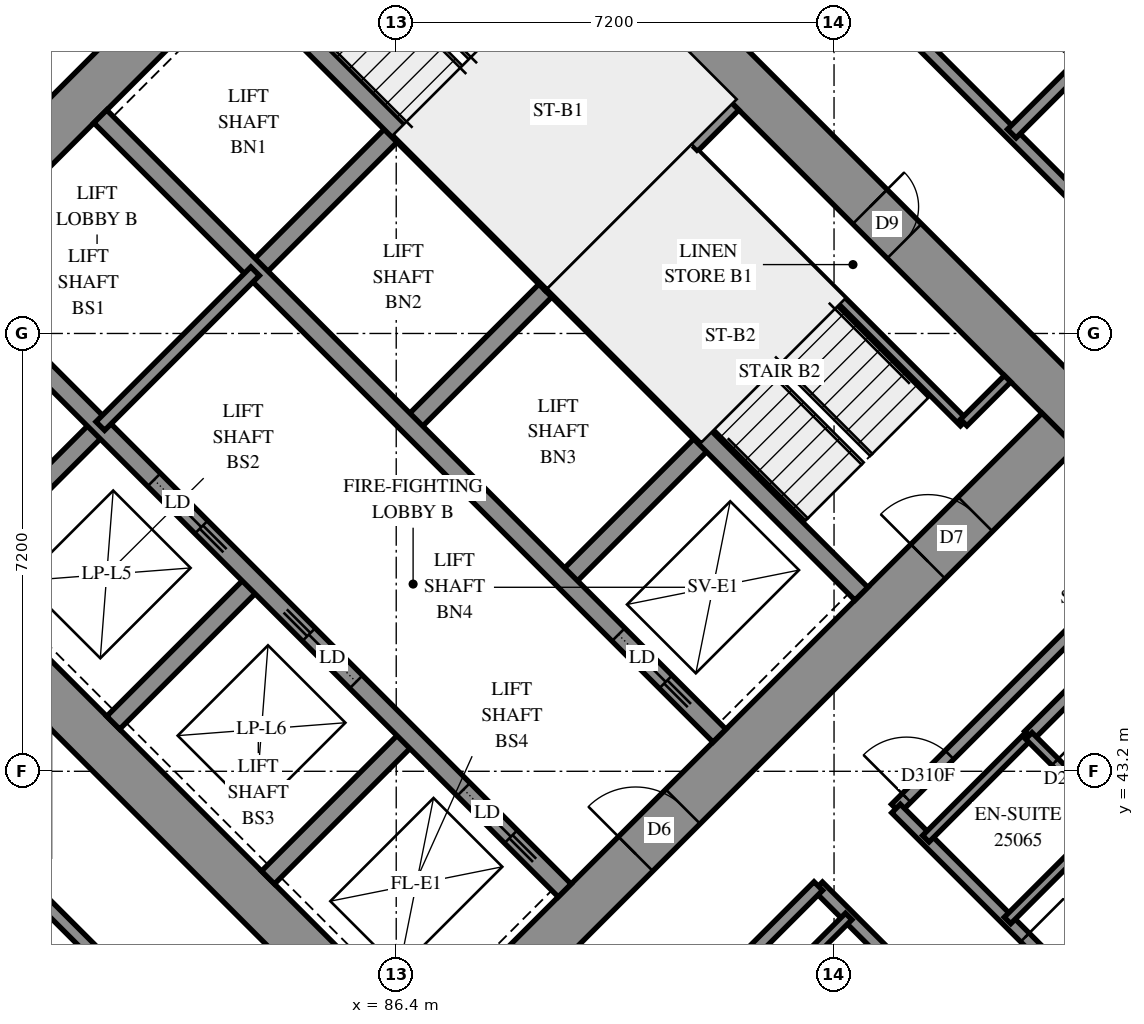
"""IFC4 building model, lengths in metres.
Left out: names, types, materials, properties, quantities, classifications, styles, units other than length and angle.
Written with IfcOpenShell. Run it as: python <this file> out.ifc"""

import sys

from ifc_helpers import new_model, si_unit, direction, frame, frame_2d, origin, place, context, subcontext, project, spatial, polyline, rectangle, outline, extrude, element, fill, save


model = new_model("IFC4")
c1 = context("Model", 3, precision=1e-05, world=origin(), true_north=direction((0.0, 1.0)))
c2 = subcontext(c1, "Body", "Model", "MODEL_VIEW")
j1 = project(units=[si_unit("LENGTHUNIT", "METRE"), si_unit("PLANEANGLEUNIT", "RADIAN")], contexts=[c1])
p1 = place(None, origin())
s1 = spatial("IfcSite", under=j1, at=p1, CompositionType="ELEMENT")
p2 = place(p1, origin())
s2 = spatial("IfcBuilding", under=s1, at=p2, CompositionType="ELEMENT")
p3 = place(p2, frame((0.0, 0.0, 94.8)))
s3 = spatial("IfcBuildingStorey", under=s2, at=p3, CompositionType="ELEMENT", Elevation=94.8)
p4 = place(p3, frame((75.806, 49.373, -0.3), z_axis=(0.0, 0.0, 1.0), x_axis=(0.7071067812, -0.7071067812, 0.0)))
e1 = element("IfcWall", 1, at=p4, inside=s3, PredefinedType="SHEAR", context=c2, shape_type="SweptSolid", body=[
    extrude(rectangle(XDim=16.0, YDim=0.8, at=frame_2d((8.0, 0.0))), origin(), (0.0, 0.0, 1.0), 2.7),
])
p5 = place(p3, frame((86.554, 60.121, -0.3), z_axis=(0.0, 0.0, 1.0), x_axis=(0.7071067812, -0.7071067812, 0.0)))
e2 = element("IfcWall", 2, at=p5, inside=s3, PredefinedType="SHEAR", context=c2, shape_type="SweptSolid", body=[
    extrude(rectangle(XDim=16.0, YDim=0.8, at=frame_2d((8.0, 0.0))), origin(), (0.0, 0.0, 1.0), 2.7),
])
p6 = place(p5, frame((10.8, 0.0, 0.3)))
e3 = element("IfcOpeningElement", 3, at=p6, cuts=e2, PredefinedType="OPENING", context=c2, shape_type="SweptSolid", body=[
    extrude(rectangle(XDim=0.8, YDim=2.1, at=frame_2d((0.4, 1.05))), frame((0.0, 0.41, 0.0), z_axis=(0.0, -1.0, 0.0), x_axis=(1.0, 0.0, 0.0)), (0.0, 0.0, 1.0), 0.82),
])
p7 = place(p3, frame((76.372, 49.373, -0.3), z_axis=(0.0, 0.0, 1.0), x_axis=(0.7071067812, 0.7071067812, 0.0)))
e4 = element("IfcWall", 4, at=p7, inside=s3, PredefinedType="SHEAR", context=c2, shape_type="SweptSolid", body=[
    extrude(rectangle(XDim=14.4, YDim=0.8, at=frame_2d((7.2, 0.0))), origin(), (0.0, 0.0, 1.0), 2.7),
])
p8 = place(p7, frame((4.55, 0.0, 0.3)))
e5 = element("IfcOpeningElement", 5, at=p8, cuts=e4, PredefinedType="OPENING", context=c2, shape_type="SweptSolid", body=[
    extrude(rectangle(XDim=1.1, YDim=2.1, at=frame_2d((0.55, 1.05))), frame((0.0, 0.41, 0.0), z_axis=(0.0, -1.0, 0.0), x_axis=(1.0, 0.0, 0.0)), (0.0, 0.0, 1.0), 0.82),
])
p9 = place(p7, frame((11.35, 0.0, 0.3)))
e6 = element("IfcOpeningElement", 6, at=p9, cuts=e4, PredefinedType="OPENING", context=c2, shape_type="SweptSolid", body=[
    extrude(rectangle(XDim=1.1, YDim=2.1, at=frame_2d((0.55, 1.05))), frame((0.0, 0.41, 0.0), z_axis=(0.0, -1.0, 0.0), x_axis=(1.0, 0.0, 0.0)), (0.0, 0.0, 1.0), 0.82),
])
p10 = place(p3, frame((87.12, 38.625, -0.3), z_axis=(0.0, 0.0, 1.0), x_axis=(0.7071067812, 0.7071067812, 0.0)))
e7 = element("IfcWall", 7, at=p10, inside=s3, PredefinedType="SHEAR", context=c2, shape_type="SweptSolid", body=[
    extrude(rectangle(XDim=14.4, YDim=0.8, at=frame_2d((7.2, 0.0))), origin(), (0.0, 0.0, 1.0), 2.7),
])
p11 = place(p10, frame((4.55, 0.0, 0.3)))
e8 = element("IfcOpeningElement", 8, at=p11, cuts=e7, PredefinedType="OPENING", context=c2, shape_type="SweptSolid", body=[
    extrude(rectangle(XDim=1.1, YDim=2.1, at=frame_2d((0.55, 1.05))), frame((0.0, 0.41, 0.0), z_axis=(0.0, -1.0, 0.0), x_axis=(1.0, 0.0, 0.0)), (0.0, 0.0, 1.0), 0.82),
])
p12 = place(p10, frame((11.35, 0.0, 0.3)))
e9 = element("IfcOpeningElement", 9, at=p12, cuts=e7, PredefinedType="OPENING", context=c2, shape_type="SweptSolid", body=[
    extrude(rectangle(XDim=1.1, YDim=2.1, at=frame_2d((0.55, 1.05))), frame((0.0, 0.41, 0.0), z_axis=(0.0, -1.0, 0.0), x_axis=(1.0, 0.0, 0.0)), (0.0, 0.0, 1.0), 0.82),
])
for number, where, z_axis, x_axis in (
    (10, (79.2, 46.544, 0.0), (0.0, 0.0, 1.0), (0.707, 0.707, 0.0)),
    (11, (84.079, 51.423, 0.0), (0.0, 0.0, 1.0), (0.707, 0.707, 0.0)),
):
    element("IfcWall", number, at=place(p3, frame(where, z_axis=z_axis, x_axis=x_axis)), inside=s3, PredefinedType="SOLIDWALL", context=c2, shape_type="SweptSolid", body=[
        extrude(rectangle(XDim=3.3, YDim=0.3, at=frame_2d((1.65, 0.0))), origin(), (0.0, 0.0, 1.0), 3.1),
    ])
p13 = place(p3, frame((81.746, 43.999, 0.0), z_axis=(0.0, 0.0, 1.0), x_axis=(0.7071067812, 0.7071067812, 0.0)))
e12 = element("IfcWall", 12, at=p13, inside=s3, PredefinedType="SOLIDWALL", context=c2, shape_type="SweptSolid", body=[
    extrude(rectangle(XDim=3.3, YDim=0.3, at=frame_2d((1.65, 0.0))), origin(), (0.0, 0.0, 1.0), 3.1),
])
p14 = place(p3, frame((86.625, 48.878, 0.0), z_axis=(0.0, 0.0, 1.0), x_axis=(0.7071067812, 0.7071067812, 0.0)))
e13 = element("IfcWall", 13, at=p14, inside=s3, PredefinedType="SOLIDWALL", context=c2, shape_type="SweptSolid", body=[
    extrude(rectangle(XDim=3.3, YDim=0.3, at=frame_2d((1.65, 0.0))), origin(), (0.0, 0.0, 1.0), 3.1),
])
p15 = place(p3, frame((84.291, 41.453, 0.0), z_axis=(0.0, 0.0, 1.0), x_axis=(0.7071067812, 0.7071067812, 0.0)))
e14 = element("IfcWall", 14, at=p15, inside=s3, PredefinedType="SOLIDWALL", context=c2, shape_type="SweptSolid", body=[
    extrude(rectangle(XDim=3.3, YDim=0.3, at=frame_2d((1.65, 0.0))), origin(), (0.0, 0.0, 1.0), 3.1),
])
p16 = place(p3, frame((89.17, 46.332, 0.0), z_axis=(0.0, 0.0, 1.0), x_axis=(0.7071067812, 0.7071067812, 0.0)))
e15 = element("IfcWall", 15, at=p16, inside=s3, PredefinedType="SOLIDWALL", context=c2, shape_type="SweptSolid", body=[
    extrude(rectangle(XDim=3.3, YDim=0.3, at=frame_2d((1.65, 0.0))), origin(), (0.0, 0.0, 1.0), 3.1),
])
p17 = place(p3, frame((78.988, 51.423, 0.0), z_axis=(0.0, 0.0, 1.0), x_axis=(0.7071067812, -0.7071067812, 0.0)))
e16 = element("IfcWall", 16, at=p17, inside=s3, PredefinedType="SOLIDWALL", context=c2, shape_type="SweptSolid", body=[
    extrude(rectangle(XDim=14.4, YDim=0.3, at=frame_2d((7.2, 0.0))), origin(), (0.0, 0.0, 1.0), 3.1),
])
p18 = place(p17, frame((1.25, 0.0, 0.0)))
e17 = element("IfcOpeningElement", 17, at=p18, cuts=e16, PredefinedType="OPENING", context=c2, shape_type="SweptSolid", body=[
    extrude(rectangle(XDim=1.1, YDim=2.1, at=frame_2d((0.55, 1.05))), frame((0.0, 0.16, 0.0), z_axis=(0.0, -1.0, 0.0), x_axis=(1.0, 0.0, 0.0)), (0.0, 0.0, 1.0), 0.32),
])
p19 = place(p17, frame((4.85, 0.0, 0.0)))
e18 = element("IfcOpeningElement", 18, at=p19, cuts=e16, PredefinedType="OPENING", context=c2, shape_type="SweptSolid", body=[
    extrude(rectangle(XDim=1.1, YDim=2.1, at=frame_2d((0.55, 1.05))), frame((0.0, 0.16, 0.0), z_axis=(0.0, -1.0, 0.0), x_axis=(1.0, 0.0, 0.0)), (0.0, 0.0, 1.0), 0.32),
])
p20 = place(p17, frame((8.45, 0.0, 0.0)))
e19 = element("IfcOpeningElement", 19, at=p20, cuts=e16, PredefinedType="OPENING", context=c2, shape_type="SweptSolid", body=[
    extrude(rectangle(XDim=1.1, YDim=2.1, at=frame_2d((0.55, 1.05))), frame((0.0, 0.16, 0.0), z_axis=(0.0, -1.0, 0.0), x_axis=(1.0, 0.0, 0.0)), (0.0, 0.0, 1.0), 0.32),
])
p21 = place(p17, frame((12.05, 0.0, 0.0)))
e20 = element("IfcOpeningElement", 20, at=p21, cuts=e16, PredefinedType="OPENING", context=c2, shape_type="SweptSolid", body=[
    extrude(rectangle(XDim=1.1, YDim=2.1, at=frame_2d((0.55, 1.05))), frame((0.0, 0.16, 0.0), z_axis=(0.0, -1.0, 0.0), x_axis=(1.0, 0.0, 0.0)), (0.0, 0.0, 1.0), 0.32),
])
p22 = place(p3, frame((81.534, 53.969, 0.0), z_axis=(0.0, 0.0, 1.0), x_axis=(0.707103309, -0.7071102534, 0.0)))
e21 = element("IfcWall", 21, at=p22, inside=s3, PredefinedType="SOLIDWALL", context=c2, shape_type="SweptSolid", body=[
    extrude(rectangle(XDim=14.4, YDim=0.3, at=frame_2d((7.2, 0.0))), origin(), (0.0, 0.0, 1.0), 3.1),
])
p23 = place(p22, frame((12.05, 0.0, 0.0)))
e22 = element("IfcOpeningElement", 22, at=p23, cuts=e21, PredefinedType="OPENING", context=c2, shape_type="SweptSolid", body=[
    extrude(rectangle(XDim=1.1, YDim=2.1, at=frame_2d((0.55, 1.05))), frame((0.0, 0.16, 0.0), z_axis=(0.0, -1.0, 0.0), x_axis=(1.0, 0.0, 0.0)), (0.0, 0.0, 1.0), 0.32),
])
for number, where, z_axis, x_axis in (
    (23, (83.867, 56.302, 0.0), (0.0, 0.0, 1.0), (0.707, -0.707, 0.0)),
    (24, (88.958, 51.211, 0.0), (0.0, 0.0, 1.0), (0.707, -0.707, 0.0)),
):
    element("IfcWall", number, at=place(p3, frame(where, z_axis=z_axis, x_axis=x_axis)), inside=s3, PredefinedType="SOLIDWALL", context=c2, shape_type="SweptSolid", body=[
        extrude(rectangle(XDim=7.2, YDim=0.3, at=frame_2d((3.6, 0.0))), origin(), (0.0, 0.0, 1.0), 3.1),
    ])
p24 = place(p3, frame((88.958, 51.211, 0.0), z_axis=(0.0, 0.0, 1.0), x_axis=(0.7071067812, 0.7071067812, 0.0)))
e25 = element("IfcWall", 25, at=p24, inside=s3, PredefinedType="SOLIDWALL", context=c2, shape_type="SweptSolid", body=[
    extrude(rectangle(XDim=4.2, YDim=0.3, at=frame_2d((2.1, 0.0))), origin(), (0.0, 0.0, 1.0), 3.1),
])
p25 = place(p3, frame((98.782, 54.319, 0.0), z_axis=(0.0, 0.0, 1.0), x_axis=(-0.7884655926, 0.6150788643, 0.0)))
e26 = element("IfcWall", 26, at=p25, inside=s3, PredefinedType="SOLIDWALL", context=c2, shape_type="SweptSolid", body=[
    extrude(outline(polyline([(-0.034, -0.275), (3.401, -0.275), (3.468, 0.275), (0.034, 0.275), (-0.034, -0.275)])), origin(), (0.0, 0.0, 1.0), 3.1),
])
p26 = place(p25, frame((1.596, 0.0, 0.5)))
e27 = element("IfcOpeningElement", 27, at=p26, cuts=e26, PredefinedType="OPENING", context=c2, shape_type="SweptSolid", body=[
    extrude(rectangle(XDim=1.2, YDim=2.45, at=frame_2d((0.6, 1.225))), frame((0.0, 0.285, 0.0), z_axis=(0.0, -1.0, 0.0), x_axis=(1.0, 0.0, 0.0)), (0.0, 0.0, 1.0), 0.57),
])
p27 = place(p3, frame((91.313, 53.354, 0.0), z_axis=(0.0, 0.0, 1.0), x_axis=(0.7071147811, -0.7070987812, 0.0)))
e28 = element("IfcWall", 28, at=p27, inside=s3, PredefinedType="PARTITIONING", context=c2, shape_type="SweptSolid", body=[
    extrude(rectangle(XDim=6.25, YDim=0.15, at=frame_2d((3.125, 0.0))), origin(), (0.0, 0.0, 1.0), 3.1),
])
p28 = place(p3, frame((95.732, 48.934, 0.0), z_axis=(0.0, 0.0, 1.0), x_axis=(0.7071067812, 0.7071067812, 0.0)))
e29 = element("IfcWall", 29, at=p28, inside=s3, PredefinedType="PARTITIONING", context=c2, shape_type="SweptSolid", body=[
    extrude(rectangle(XDim=1.02, YDim=0.15, at=frame_2d((0.51, 0.0))), origin(), (0.0, 0.0, 1.0), 3.1),
])
p29 = place(p3, frame((81.534, 48.878, 0.0), z_axis=(0.0, 0.0, 1.0), x_axis=(0.707092892, 0.7071206701, 0.0)))
e30 = element("IfcWall", 30, at=p29, inside=s3, PredefinedType="PARTITIONING", context=c2, shape_type="SweptSolid", body=[
    extrude(rectangle(XDim=3.6, YDim=0.2, at=frame_2d((1.8, 0.0))), origin(), (0.0, 0.0, 1.0), 3.1),
])
p30 = place(p3, frame((93.339, 41.309, 0.0), z_axis=(0.0, 0.0, 1.0), x_axis=(0.7071067812, -0.7071067812, 0.0)))
e31 = element("IfcWall", 31, at=p30, inside=s3, PredefinedType="PARTITIONING", context=c2, shape_type="SweptSolid", body=[
    extrude(rectangle(XDim=18.702, YDim=0.2, at=frame_2d((9.351, 0.0))), origin(), (0.0, 0.0, 1.0), 3.1),
])
p31 = place(p30, frame((3.05, 0.0, 0.0)))
e32 = element("IfcOpeningElement", 32, at=p31, cuts=e31, PredefinedType="OPENING", context=c2, shape_type="SweptSolid", body=[
    extrude(rectangle(XDim=0.9, YDim=2.1, at=frame_2d((0.45, 1.05))), frame((0.0, 0.11, 0.0), z_axis=(0.0, -1.0, 0.0), x_axis=(1.0, 0.0, 0.0)), (0.0, 0.0, 1.0), 0.22),
])
p32 = place(p30, frame((4.7, 0.0, 0.0)))
e33 = element("IfcOpeningElement", 33, at=p32, cuts=e31, PredefinedType="OPENING", context=c2, shape_type="SweptSolid", body=[
    extrude(rectangle(XDim=0.9, YDim=2.1, at=frame_2d((0.45, 1.05))), frame((0.0, 0.11, 0.0), z_axis=(0.0, -1.0, 0.0), x_axis=(1.0, 0.0, 0.0)), (0.0, 0.0, 1.0), 0.22),
])
p33 = place(p30, frame((10.149, 0.0, 0.0)))
e34 = element("IfcOpeningElement", 34, at=p33, cuts=e31, PredefinedType="OPENING", context=c2, shape_type="SweptSolid", body=[
    extrude(rectangle(XDim=0.9, YDim=2.1, at=frame_2d((0.45, 1.05))), frame((0.0, 0.11, 0.0), z_axis=(0.0, -1.0, 0.0), x_axis=(1.0, 0.0, 0.0)), (0.0, 0.0, 1.0), 0.22),
])
p34 = place(p30, frame((11.9, 0.0, 0.0)))
e35 = element("IfcOpeningElement", 35, at=p34, cuts=e31, PredefinedType="OPENING", context=c2, shape_type="SweptSolid", body=[
    extrude(rectangle(XDim=0.9, YDim=2.1, at=frame_2d((0.45, 1.05))), frame((0.0, 0.11, 0.0), z_axis=(0.0, -1.0, 0.0), x_axis=(1.0, 0.0, 0.0)), (0.0, 0.0, 1.0), 0.22),
])
p35 = place(p30, frame((17.45, 0.0, 0.0)))
e36 = element("IfcOpeningElement", 36, at=p35, cuts=e31, PredefinedType="OPENING", context=c2, shape_type="SweptSolid", body=[
    extrude(rectangle(XDim=0.9, YDim=2.1, at=frame_2d((0.45, 1.05))), frame((0.0, 0.11, 0.0), z_axis=(0.0, -1.0, 0.0), x_axis=(1.0, 0.0, 0.0)), (0.0, 0.0, 1.0), 0.22),
])
p36 = place(p3, frame((86.835, 34.806, 0.0), z_axis=(0.0, 0.0, 1.0), x_axis=(0.7071067812, 0.7071067812, 0.0)))
e37 = element("IfcWall", 37, at=p36, inside=s3, PredefinedType="PARTITIONING", context=c2, shape_type="SweptSolid", body=[
    extrude(rectangle(XDim=9.201, YDim=0.2, at=frame_2d((4.601, 0.0))), origin(), (0.0, 0.0, 1.0), 3.1),
])
p37 = place(p3, frame((94.615, 42.587, 0.0), z_axis=(0.0, 0.0, 1.0), x_axis=(0.7071067812, 0.7071067812, 0.0)))
e38 = element("IfcWall", 38, at=p37, inside=s3, PredefinedType="PARTITIONING", context=c2, shape_type="SweptSolid", body=[
    extrude(rectangle(XDim=9.198, YDim=0.2, at=frame_2d((4.599, 0.0))), origin(), (0.0, 0.0, 1.0), 3.1),
])
p38 = place(p37, frame((0.248, 0.0, 0.0)))
e39 = element("IfcOpeningElement", 39, at=p38, cuts=e38, PredefinedType="OPENING", context=c2, shape_type="SweptSolid", body=[
    extrude(rectangle(XDim=1.0, YDim=2.1, at=frame_2d((0.5, 1.05))), frame((0.0, 0.11, 0.0), z_axis=(0.0, -1.0, 0.0), x_axis=(1.0, 0.0, 0.0)), (0.0, 0.0, 1.0), 0.22),
])
p39 = place(p3, frame((96.805, 43.787, 0.0), z_axis=(0.0, 0.0, 1.0), x_axis=(0.7071126822, 0.7071008801, 0.0)))
e40 = element("IfcWall", 40, at=p39, inside=s3, PredefinedType="PARTITIONING", context=c2, shape_type="SweptSolid", body=[
    extrude(rectangle(XDim=8.473, YDim=0.2, at=frame_2d((4.237, 0.0))), origin(), (0.0, 0.0, 1.0), 3.1),
])
p40 = place(p3, frame((94.62, 42.587, 0.0), z_axis=(0.0, 0.0, 1.0), x_axis=(0.7071067812, -0.7071067812, 0.0)))
e41 = element("IfcWall", 41, at=p40, inside=s3, PredefinedType="PARTITIONING", context=c2, shape_type="SweptSolid", body=[
    extrude(rectangle(XDim=7.9, YDim=0.2, at=frame_2d((3.95, 0.0))), origin(), (0.0, 0.0, 1.0), 3.1),
])
p41 = place(p40, frame((2.998, 0.0, 0.0)))
e42 = element("IfcOpeningElement", 42, at=p41, cuts=e41, PredefinedType="OPENING", context=c2, shape_type="SweptSolid", body=[
    extrude(rectangle(XDim=0.9, YDim=2.1, at=frame_2d((0.45, 1.05))), frame((0.0, 0.11, 0.0), z_axis=(0.0, -1.0, 0.0), x_axis=(1.0, 0.0, 0.0)), (0.0, 0.0, 1.0), 0.22),
])
p42 = place(p40, frame((4.649, 0.0, 0.0)))
e43 = element("IfcOpeningElement", 43, at=p42, cuts=e41, PredefinedType="OPENING", context=c2, shape_type="SweptSolid", body=[
    extrude(rectangle(XDim=0.9, YDim=2.1, at=frame_2d((0.45, 1.05))), frame((0.0, 0.11, 0.0), z_axis=(0.0, -1.0, 0.0), x_axis=(1.0, 0.0, 0.0)), (0.0, 0.0, 1.0), 0.22),
])
p43 = place(p3, frame((93.981, 56.223, 0.0), z_axis=(0.0, 0.0, 1.0), x_axis=(0.7071067812, -0.7071067812, 0.0)))
e44 = element("IfcWall", 44, at=p43, inside=s3, PredefinedType="PARTITIONING", context=c2, shape_type="SweptSolid", body=[
    extrude(rectangle(XDim=7.184, YDim=0.2, at=frame_2d((3.592, 0.0))), origin(), (0.0, 0.0, 1.0), 3.1),
])
p44 = place(p3, frame((80.197, 41.453, 0.0), z_axis=(0.0, 0.0, 1.0), x_axis=(0.7071067812, -0.7071067812, 0.0)))
e45 = element("IfcWall", 45, at=p44, inside=s3, PredefinedType="PARTITIONING", context=c2, shape_type="SweptSolid", body=[
    extrude(rectangle(XDim=6.488, YDim=0.2, at=frame_2d((3.244, 0.0))), origin(), (0.0, 0.0, 1.0), 3.1),
])
p45 = place(p3, frame((92.143, 39.117, 0.0), z_axis=(0.0, 0.0, 1.0), x_axis=(0.7075233388, 0.706689978, 0.0)))
e46 = element("IfcWall", 46, at=p45, inside=s3, PredefinedType="PARTITIONING", context=c2, shape_type="SweptSolid", body=[
    extrude(rectangle(XDim=2.4, YDim=0.15, at=frame_2d((1.2, 0.0))), origin(), (0.0, 0.0, 1.0), 3.1),
])
for number, where, z_axis, x_axis in (
    (47, (96.453, 40.747, 0.0), (0.0, 0.0, 1.0), (0.707, 0.707, 0.0)),
    (48, (95.109, 42.091, 0.0), (0.0, 0.0, 1.0), (0.707, 0.707, 0.0)),
):
    element("IfcWall", number, at=place(p3, frame(where, z_axis=z_axis, x_axis=x_axis)), inside=s3, PredefinedType="PARTITIONING", context=c2, shape_type="SweptSolid", body=[
        extrude(rectangle(XDim=2.398, YDim=0.15, at=frame_2d((1.199, 0.0))), origin(), (0.0, 0.0, 1.0), 3.1),
    ])
p46 = place(p3, frame((96.803, 43.783, 0.0), z_axis=(0.0, 0.0, 1.0), x_axis=(0.7071067812, -0.7071067812, 0.0)))
e49 = element("IfcWall", 49, at=p46, inside=s3, PredefinedType="PARTITIONING", context=c2, shape_type="SweptSolid", body=[
    extrude(rectangle(XDim=1.901, YDim=0.15, at=frame_2d((0.95, 0.0))), origin(), (0.0, 0.0, 1.0), 3.1),
])
p47 = place(p46, frame((0.609, 0.0, 0.0)))
e50 = element("IfcOpeningElement", 50, at=p47, cuts=e49, PredefinedType="OPENING", context=c2, shape_type="SweptSolid", body=[
    extrude(rectangle(XDim=0.8, YDim=2.1, at=frame_2d((0.4, 1.05))), frame((0.0, 0.085, 0.0), z_axis=(0.0, -1.0, 0.0), x_axis=(1.0, 0.0, 0.0)), (0.0, 0.0, 1.0), 0.17),
])
p48 = place(p3, frame((96.523, 53.687, 0.0), z_axis=(0.0, 0.0, 1.0), x_axis=(0.7070760086, 0.7071375524, 0.0)))
e51 = element("IfcWall", 51, at=p48, inside=s3, PredefinedType="PARTITIONING", context=c2, shape_type="SweptSolid", body=[
    extrude(rectangle(XDim=1.625, YDim=0.2, at=frame_2d((0.812, 0.0))), origin(), (0.0, 0.0, 1.0), 3.1),
])
p49 = place(p6, origin())
e52 = element("IfcDoor", 52, at=p49, inside=s3, OperationType="SINGLE_SWING_RIGHT", PredefinedType="DOOR", context=c2, shape_type="SweptSolid", body=[
    extrude(rectangle(XDim=0.8, YDim=2.1, at=frame_2d((0.4, 1.05))), frame((0.0, -0.34, 0.0), z_axis=(0.0, -1.0, 0.0), x_axis=(1.0, 0.0, 0.0)), (0.0, 0.0, 1.0), 0.05),
])
fill(e3, e52)
p50 = place(p11, origin())
e53 = element("IfcDoor", 53, at=p50, inside=s3, OperationType="DOUBLE_DOOR_SINGLE_SWING", PredefinedType="DOOR", context=c2, shape_type="SweptSolid", body=[
    extrude(rectangle(XDim=1.1, YDim=2.1, at=frame_2d((0.55, 1.05))), frame((0.0, 0.025, 0.0), z_axis=(0.0, -1.0, 0.0), x_axis=(1.0, 0.0, 0.0)), (0.0, 0.0, 1.0), 0.05),
])
fill(e8, e53)
p51 = place(p12, origin())
e54 = element("IfcDoor", 54, at=p51, inside=s3, OperationType="SINGLE_SWING_RIGHT", PredefinedType="DOOR", context=c2, shape_type="SweptSolid", body=[
    extrude(rectangle(XDim=1.1, YDim=2.1, at=frame_2d((0.55, 1.05))), frame((0.0, 0.025, 0.0), z_axis=(0.0, -1.0, 0.0), x_axis=(1.0, 0.0, 0.0)), (0.0, 0.0, 1.0), 0.05),
])
fill(e9, e54)
p52 = place(p19, origin())
e55 = element("IfcDoor", 55, at=p52, inside=s3, OperationType="SLIDING_TO_RIGHT", PredefinedType="DOOR", context=c2, shape_type="SweptSolid", body=[
    extrude(rectangle(XDim=1.1, YDim=2.1, at=frame_2d((0.55, 1.05))), frame((0.0, 0.025, 0.0), z_axis=(0.0, -1.0, 0.0), x_axis=(1.0, 0.0, 0.0)), (0.0, 0.0, 1.0), 0.05),
])
fill(e18, e55)
p53 = place(p20, origin())
e56 = element("IfcDoor", 56, at=p53, inside=s3, OperationType="SLIDING_TO_LEFT", PredefinedType="DOOR", context=c2, shape_type="SweptSolid", body=[
    extrude(rectangle(XDim=1.1, YDim=2.1, at=frame_2d((0.55, 1.05))), frame((0.0, 0.025, 0.0), z_axis=(0.0, -1.0, 0.0), x_axis=(1.0, 0.0, 0.0)), (0.0, 0.0, 1.0), 0.05),
])
fill(e19, e56)
p54 = place(p21, origin())
e57 = element("IfcDoor", 57, at=p54, inside=s3, OperationType="SLIDING_TO_RIGHT", PredefinedType="DOOR", context=c2, shape_type="SweptSolid", body=[
    extrude(rectangle(XDim=1.1, YDim=2.1, at=frame_2d((0.55, 1.05))), frame((0.0, 0.025, 0.0), z_axis=(0.0, -1.0, 0.0), x_axis=(1.0, 0.0, 0.0)), (0.0, 0.0, 1.0), 0.05),
])
fill(e20, e57)
p55 = place(p23, origin())
e58 = element("IfcDoor", 58, at=p55, inside=s3, OperationType="SLIDING_TO_RIGHT", PredefinedType="DOOR", context=c2, shape_type="SweptSolid", body=[
    extrude(rectangle(XDim=1.1, YDim=2.1, at=frame_2d((0.55, 1.05))), frame((0.0, 0.025, 0.0), z_axis=(0.0, -1.0, 0.0), x_axis=(1.0, 0.0, 0.0)), (0.0, 0.0, 1.0), 0.05),
])
fill(e22, e58)
p56 = place(p38, origin())
e59 = element("IfcDoor", 59, at=p56, inside=s3, OperationType="SINGLE_SWING_RIGHT", PredefinedType="DOOR", context=c2, shape_type="SweptSolid", body=[
    extrude(rectangle(XDim=1.0, YDim=2.1, at=frame_2d((0.5, 1.05))), frame((0.0, 0.025, 0.0), z_axis=(0.0, -1.0, 0.0), x_axis=(1.0, 0.0, 0.0)), (0.0, 0.0, 1.0), 0.05),
])
fill(e39, e59)
p57 = place(p41, origin())
e60 = element("IfcDoor", 60, at=p57, inside=s3, OperationType="SINGLE_SWING_RIGHT", PredefinedType="DOOR", context=c2, shape_type="SweptSolid", body=[
    extrude(rectangle(XDim=0.9, YDim=2.1, at=frame_2d((0.45, 1.05))), frame((0.0, 0.025, 0.0), z_axis=(0.0, -1.0, 0.0), x_axis=(1.0, 0.0, 0.0)), (0.0, 0.0, 1.0), 0.05),
])
fill(e42, e60)
p58 = place(p47, origin())
e61 = element("IfcDoor", 61, at=p58, inside=s3, OperationType="SINGLE_SWING_RIGHT", PredefinedType="DOOR", context=c2, shape_type="SweptSolid", body=[
    extrude(rectangle(XDim=0.8, YDim=2.1, at=frame_2d((0.4, 1.05))), frame((0.0, 0.025, 0.0), z_axis=(0.0, -1.0, 0.0), x_axis=(1.0, 0.0, 0.0)), (0.0, 0.0, 1.0), 0.05),
])
fill(e50, e61)
save(model, sys.argv[1])
